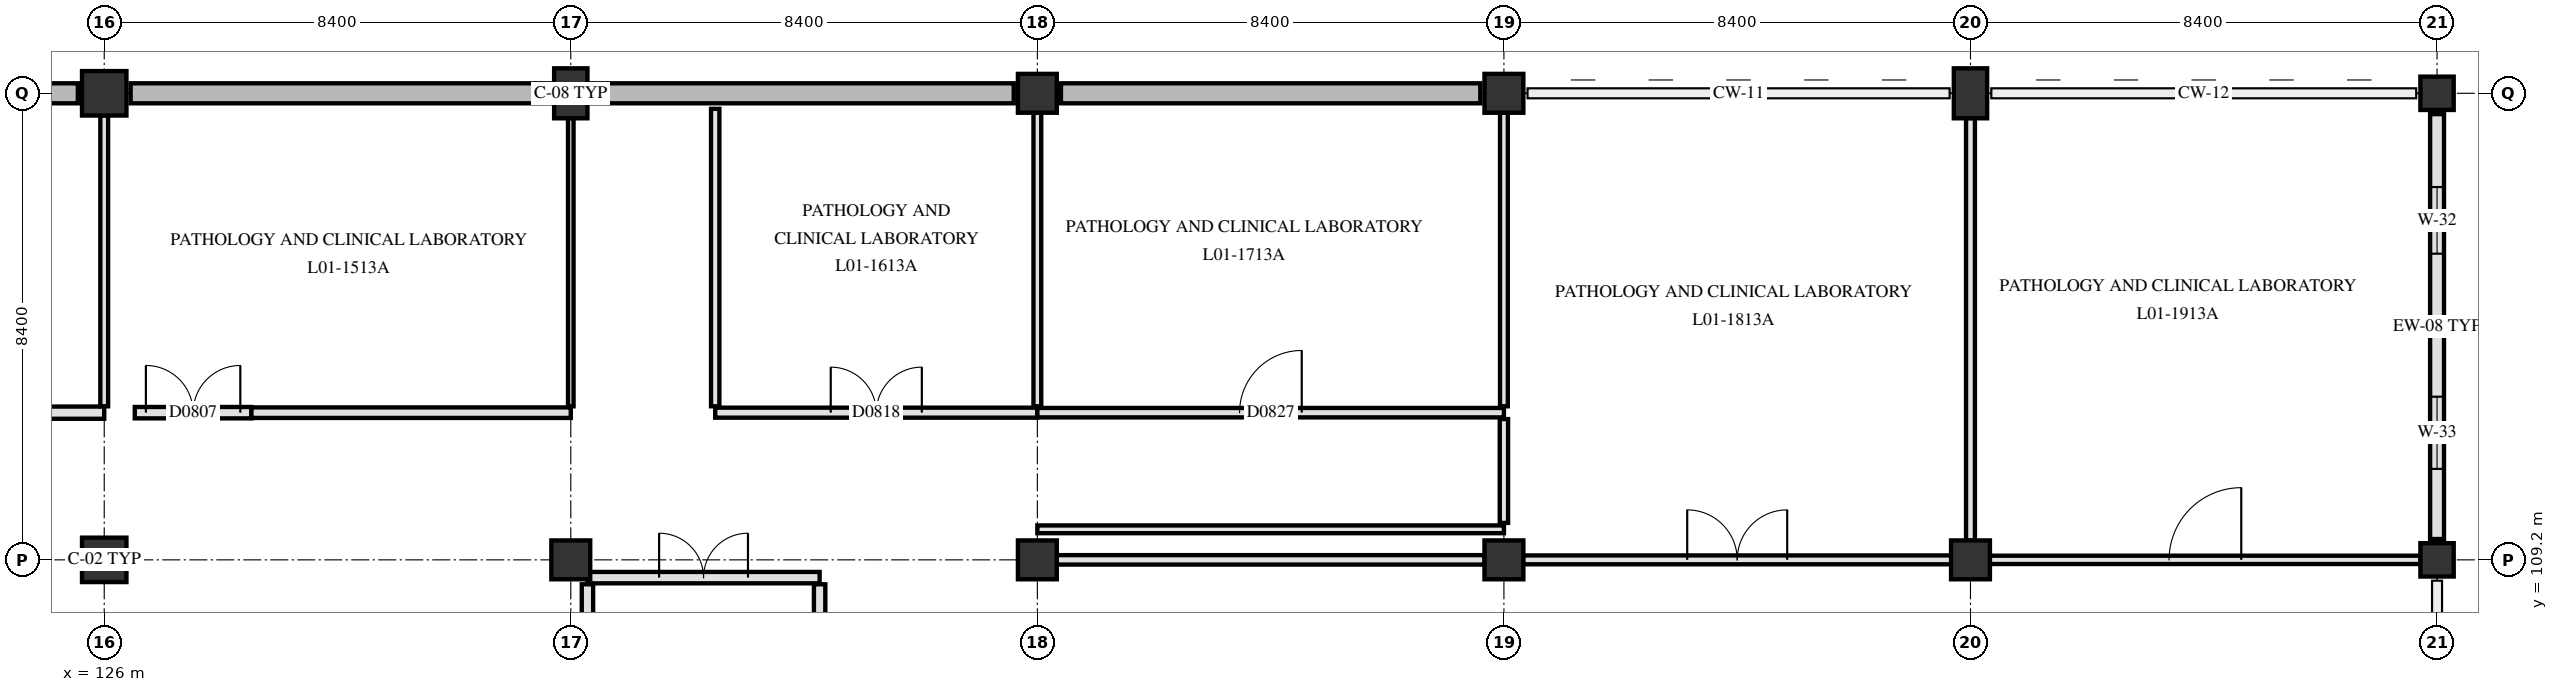
"""IFC4 building model, lengths in metres.
Left out: names, types, materials, properties, quantities, classifications, styles, units other than length and angle.
Written with IfcOpenShell. Run it as: python <this file> out.ifc"""

import sys

from ifc_helpers import new_model, si_unit, direction, frame, frame_2d, origin, origin_2d, place, context, subcontext, project, spatial, rectangle, extrude, element, fill, save


model = new_model("IFC4")
c1 = context("Model", 3, precision=1e-05, world=origin(), true_north=direction((0.0, 1.0)))
c2 = subcontext(c1, "Body", "Model", "MODEL_VIEW")
j1 = project(units=[si_unit("LENGTHUNIT", "METRE"), si_unit("PLANEANGLEUNIT", "RADIAN")], contexts=[c1])
p1 = place(None, origin())
s1 = spatial("IfcSite", under=j1, at=p1, CompositionType="ELEMENT")
p2 = place(p1, origin())
s2 = spatial("IfcBuilding", under=s1, at=p2, CompositionType="ELEMENT")
p3 = place(p2, frame((0.0, 0.0, 4.8)))
s3 = spatial("IfcBuildingStorey", under=s2, at=p3, CompositionType="ELEMENT", Elevation=4.8)
for number, where, z_axis, x_axis in (
    (1, (126.0, 109.2, 0.0), (0.0, 0.0, 1.0), (1.0, 0.0, 0.0)),
    (2, (126.0, 117.6, 0.0), (0.0, 0.0, 1.0), (1.0, 0.0, 0.0)),
):
    element("IfcColumn", number, at=place(p3, frame(where, z_axis=z_axis, x_axis=x_axis)), inside=s3, PredefinedType="COLUMN", context=c2, shape_type="SweptSolid", body=[
        extrude(rectangle(XDim=0.8, YDim=0.8, at=origin_2d()), origin(), (0.0, 0.0, 1.0), 4.5),
    ])
p4 = place(p3, frame((134.4, 109.2, 0.0), z_axis=(0.0, 0.0, 1.0), x_axis=(1.0, 0.0, 0.0)))
e3 = element("IfcColumn", 3, at=p4, inside=s3, PredefinedType="COLUMN", context=c2, shape_type="SweptSolid", body=[
    extrude(rectangle(XDim=0.7, YDim=0.7, at=origin_2d()), origin(), (0.0, 0.0, 1.0), 4.5),
])
p5 = place(p3, frame((134.4, 117.6, 0.0), z_axis=(0.0, 0.0, 1.0), x_axis=(1.0, 0.0, 0.0)))
e4 = element("IfcColumn", 4, at=p5, inside=s3, PredefinedType="PILASTER", context=c2, shape_type="SweptSolid", body=[
    extrude(rectangle(XDim=0.6, YDim=0.9, at=origin_2d()), origin(), (0.0, 0.0, 1.0), 4.5),
])
for number, where, z_axis, x_axis in (
    (5, (142.8, 109.2, 0.0), (0.0, 0.0, 1.0), (1.0, 0.0, 0.0)),
    (6, (142.8, 117.6, 0.0), (0.0, 0.0, 1.0), (1.0, 0.0, 0.0)),
    (7, (151.2, 109.2, 0.0), (0.0, 0.0, 1.0), (1.0, 0.0, 0.0)),
    (8, (151.2, 117.6, 0.0), (0.0, 0.0, 1.0), (1.0, 0.0, 0.0)),
    (9, (159.6, 109.2, 0.0), (0.0, 0.0, 1.0), (1.0, 0.0, 0.0)),
):
    element("IfcColumn", number, at=place(p3, frame(where, z_axis=z_axis, x_axis=x_axis)), inside=s3, PredefinedType="COLUMN", context=c2, shape_type="SweptSolid", body=[
        extrude(rectangle(XDim=0.7, YDim=0.7, at=origin_2d()), origin(), (0.0, 0.0, 1.0), 4.5),
    ])
p6 = place(p3, frame((159.6, 117.6, 0.0), z_axis=(0.0, 0.0, 1.0), x_axis=(1.0, 0.0, 0.0)))
e10 = element("IfcColumn", 10, at=p6, inside=s3, PredefinedType="PILASTER", context=c2, shape_type="SweptSolid", body=[
    extrude(rectangle(XDim=0.6, YDim=0.9, at=origin_2d()), origin(), (0.0, 0.0, 1.0), 4.5),
])
for number, where, z_axis, x_axis in (
    (11, (168.0, 109.2, 0.0), (0.0, 0.0, 1.0), (1.0, 0.0, 0.0)),
    (12, (168.0, 117.6, 0.0), (0.0, 0.0, 1.0), (1.0, 0.0, 0.0)),
):
    element("IfcColumn", number, at=place(p3, frame(where, z_axis=z_axis, x_axis=x_axis)), inside=s3, PredefinedType="COLUMN", context=c2, shape_type="SweptSolid", body=[
        extrude(rectangle(XDim=0.6, YDim=0.6, at=origin_2d()), origin(), (0.0, 0.0, 1.0), 4.5),
    ])
p7 = place(p3, frame((118.075, 117.6, 0.0), z_axis=(0.0, 0.0, 1.0), x_axis=(1.0, 0.0, 0.0)))
e13 = element("IfcWall", 13, at=p7, inside=s3, PredefinedType="SOLIDWALL", context=c2, shape_type="SweptSolid", body=[
    extrude(rectangle(XDim=7.45, YDim=0.36, at=frame_2d((3.725, 0.0))), origin(), (0.0, 0.0, 1.0), 4.15),
])
p8 = place(p3, frame((126.475, 117.6, 0.0), z_axis=(0.0, 0.0, 1.0), x_axis=(1.0, 0.0, 0.0)))
e14 = element("IfcWall", 14, at=p8, inside=s3, PredefinedType="SOLIDWALL", context=c2, shape_type="SweptSolid", body=[
    extrude(rectangle(XDim=7.55, YDim=0.36, at=frame_2d((3.775, 0.0))), origin(), (0.0, 0.0, 1.0), 4.15),
])
p9 = place(p3, frame((134.775, 117.6, 0.0), z_axis=(0.0, 0.0, 1.0), x_axis=(1.0, 0.0, 0.0)))
e15 = element("IfcWall", 15, at=p9, inside=s3, PredefinedType="SOLIDWALL", context=c2, shape_type="SweptSolid", body=[
    extrude(rectangle(XDim=7.6, YDim=0.36, at=frame_2d((3.8, 0.0))), origin(), (0.0, 0.0, 1.0), 4.15),
])
p10 = place(p3, frame((143.225, 117.6, 0.0), z_axis=(0.0, 0.0, 1.0), x_axis=(1.0, 0.0, 0.0)))
e16 = element("IfcWall", 16, at=p10, inside=s3, PredefinedType="SOLIDWALL", context=c2, shape_type="SweptSolid", body=[
    extrude(rectangle(XDim=7.55, YDim=0.36, at=frame_2d((3.775, 0.0))), origin(), (0.0, 0.0, 1.0), 4.15),
])
p11 = place(p3, frame((168.0, 117.225, 0.0), z_axis=(0.0, 0.0, 1.0), x_axis=(0.0, -1.0, 0.0)))
e17 = element("IfcWall", 17, at=p11, inside=s3, PredefinedType="SOLIDWALL", context=c2, shape_type="SweptSolid", body=[
    extrude(rectangle(XDim=7.65, YDim=0.25, at=frame_2d((3.825, 0.0))), origin(), (0.0, 0.0, 1.0), 3.44),
])
p12 = place(p11, frame((1.312, 0.0, 0.85)))
e18 = element("IfcOpeningElement", 18, at=p12, cuts=e17, PredefinedType="OPENING", context=c2, shape_type="SweptSolid", body=[
    extrude(rectangle(XDim=1.2, YDim=1.66, at=frame_2d((0.6, 0.83))), frame((0.0, 0.135, 0.0), z_axis=(0.0, -1.0, 0.0), x_axis=(1.0, 0.0, 0.0)), (0.0, 0.0, 1.0), 0.27),
])
p13 = place(p11, frame((5.087, 0.0, 0.85)))
e19 = element("IfcOpeningElement", 19, at=p13, cuts=e17, PredefinedType="OPENING", context=c2, shape_type="SweptSolid", body=[
    extrude(rectangle(XDim=1.3, YDim=1.66, at=frame_2d((0.65, 0.83))), frame((0.0, 0.135, 0.0), z_axis=(0.0, -1.0, 0.0), x_axis=(1.0, 0.0, 0.0)), (0.0, 0.0, 1.0), 0.27),
])
p14 = place(p3, frame((138.88, 104.64, 0.0), z_axis=(0.0, 0.0, 1.0), x_axis=(0.0, 1.0, 0.0)))
e20 = element("IfcWall", 20, at=p14, inside=s3, PredefinedType="PARTITIONING", context=c2, shape_type="SweptSolid", body=[
    extrude(rectangle(XDim=4.12, YDim=0.205, at=frame_2d((2.06, 0.0))), origin(), (0.0, 0.0, 1.0), 4.14),
])
p15 = place(p3, frame((134.7, 104.64, 0.0), z_axis=(0.0, 0.0, 1.0), x_axis=(0.0, 1.0, 0.0)))
e21 = element("IfcWall", 21, at=p15, inside=s3, PredefinedType="PARTITIONING", context=c2, shape_type="SweptSolid", body=[
    extrude(rectangle(XDim=4.12, YDim=0.205, at=frame_2d((2.06, 0.0))), origin(), (0.0, 0.0, 1.0), 3.59),
])
p16 = place(p3, frame((134.7, 108.88, 0.0), z_axis=(0.0, 0.0, 1.0), x_axis=(1.0, 0.0, 0.0)))
e22 = element("IfcWall", 22, at=p16, inside=s3, PredefinedType="PARTITIONING", context=c2, shape_type="SweptSolid", body=[
    extrude(rectangle(XDim=4.18, YDim=0.205, at=frame_2d((2.09, 0.0))), origin(), (0.0, 0.0, 1.0), 3.54),
])
p17 = place(p16, frame((1.29, 0.0, 0.0)))
e23 = element("IfcOpeningElement", 23, at=p17, cuts=e22, PredefinedType="OPENING", context=c2, shape_type="SweptSolid", body=[
    extrude(rectangle(XDim=1.6, YDim=2.25, at=frame_2d((0.8, 1.125))), frame((0.0, 0.113, 0.0), z_axis=(0.0, -1.0, 0.0), x_axis=(1.0, 0.0, 0.0)), (0.0, 0.0, 1.0), 0.225),
])
p18 = place(p3, frame((143.145, 109.2, 0.0), z_axis=(0.0, 0.0, 1.0), x_axis=(1.0, 0.0, 0.0)))
e24 = element("IfcWall", 24, at=p18, inside=s3, PredefinedType="PARTITIONING", context=c2, shape_type="SweptSolid", body=[
    extrude(rectangle(XDim=7.71, YDim=0.17, at=frame_2d((3.855, 0.0))), origin(), (0.0, 0.0, 1.0), 3.54),
])
p19 = place(p3, frame((151.545, 109.2, 0.0), z_axis=(0.0, 0.0, 1.0), x_axis=(1.0, 0.0, 0.0)))
e25 = element("IfcWall", 25, at=p19, inside=s3, PredefinedType="PARTITIONING", context=c2, shape_type="SweptSolid", body=[
    extrude(rectangle(XDim=7.71, YDim=0.16, at=frame_2d((3.855, 0.0))), origin(), (0.0, 0.0, 1.0), 3.54),
])
p20 = place(p19, frame((2.955, 0.0, 0.0)))
e26 = element("IfcOpeningElement", 26, at=p20, cuts=e25, PredefinedType="OPENING", context=c2, shape_type="SweptSolid", body=[
    extrude(rectangle(XDim=1.8, YDim=2.25, at=frame_2d((0.9, 1.125))), frame((0.0, 0.09, 0.0), z_axis=(0.0, -1.0, 0.0), x_axis=(1.0, 0.0, 0.0)), (0.0, 0.0, 1.0), 0.18),
])
p21 = place(p3, frame((159.945, 109.2, 0.0), z_axis=(0.0, 0.0, 1.0), x_axis=(1.0, 0.0, 0.0)))
e27 = element("IfcWall", 27, at=p21, inside=s3, PredefinedType="PARTITIONING", context=c2, shape_type="SweptSolid", body=[
    extrude(rectangle(XDim=7.76, YDim=0.15, at=frame_2d((3.88, 0.0))), origin(), (0.0, 0.0, 1.0), 3.54),
])
p22 = place(p21, frame((3.23, 0.0, 0.0)))
e28 = element("IfcOpeningElement", 28, at=p22, cuts=e27, PredefinedType="OPENING", context=c2, shape_type="SweptSolid", body=[
    extrude(rectangle(XDim=1.3, YDim=2.2, at=frame_2d((0.65, 1.1))), frame((0.0, 0.085, 0.0), z_axis=(0.0, -1.0, 0.0), x_axis=(1.0, 0.0, 0.0)), (0.0, 0.0, 1.0), 0.17),
])
p23 = place(p3, frame((142.8, 109.75, 0.0), z_axis=(0.0, 0.0, 1.0), x_axis=(1.0, 0.0, 0.0)))
e29 = element("IfcWall", 29, at=p23, inside=s3, PredefinedType="PARTITIONING", context=c2, shape_type="SweptSolid", body=[
    extrude(rectangle(XDim=8.4, YDim=0.14, at=frame_2d((4.2, 0.0))), origin(), (0.0, 0.0, 1.0), 3.59),
])
p24 = place(p3, frame((117.6, 111.85, 0.0), z_axis=(0.0, 0.0, 1.0), x_axis=(1.0, 0.0, 0.0)))
e30 = element("IfcWall", 30, at=p24, inside=s3, PredefinedType="PARTITIONING", context=c2, shape_type="SweptSolid", body=[
    extrude(rectangle(XDim=8.4, YDim=0.22, at=frame_2d((4.2, 0.0))), origin(), (0.0, 0.0, 1.0), 3.59),
])
p25 = place(p24, frame((3.74, 0.0, 0.0)))
e31 = element("IfcOpeningElement", 31, at=p25, cuts=e30, PredefinedType="OPENING", context=c2, shape_type="SweptSolid", body=[
    extrude(rectangle(XDim=0.92, YDim=2.08, at=frame_2d((0.46, 1.04))), frame((0.0, 0.12, 0.0), z_axis=(0.0, -1.0, 0.0), x_axis=(1.0, 0.0, 0.0)), (0.0, 0.0, 1.0), 0.24),
])
p26 = place(p3, frame((126.55, 111.85, 0.0), z_axis=(0.0, 0.0, 1.0), x_axis=(1.0, 0.0, 0.0)))
e32 = element("IfcWall", 32, at=p26, inside=s3, PredefinedType="PARTITIONING", context=c2, shape_type="SweptSolid", body=[
    extrude(rectangle(XDim=2.1, YDim=0.205, at=frame_2d((1.05, 0.0))), origin(), (0.0, 0.0, 1.0), 4.14),
])
p27 = place(p26, frame((0.2, 0.0, 0.0)))
e33 = element("IfcOpeningElement", 33, at=p27, cuts=e32, PredefinedType="OPENING", context=c2, shape_type="SweptSolid", body=[
    extrude(rectangle(XDim=1.7, YDim=2.25, at=frame_2d((0.85, 1.125))), frame((0.0, 0.113, 0.0), z_axis=(0.0, -1.0, 0.0), x_axis=(1.0, 0.0, 0.0)), (0.0, 0.0, 1.0), 0.225),
])
p28 = place(p3, frame((128.65, 111.85, 0.0), z_axis=(0.0, 0.0, 1.0), x_axis=(1.0, 0.0, 0.0)))
e34 = element("IfcWall", 34, at=p28, inside=s3, PredefinedType="PARTITIONING", context=c2, shape_type="SweptSolid", body=[
    extrude(rectangle(XDim=5.75, YDim=0.19, at=frame_2d((2.875, 0.0))), origin(), (0.0, 0.0, 1.0), 3.59),
])
p29 = place(p3, frame((137.0, 111.85, 0.0), z_axis=(0.0, 0.0, 1.0), x_axis=(1.0, 0.0, 0.0)))
e35 = element("IfcWall", 35, at=p29, inside=s3, PredefinedType="PARTITIONING", context=c2, shape_type="SweptSolid", body=[
    extrude(rectangle(XDim=5.8, YDim=0.18, at=frame_2d((2.9, 0.0))), origin(), (0.0, 0.0, 1.0), 3.59),
])
p30 = place(p29, frame((2.08, 0.0, 0.0)))
e36 = element("IfcOpeningElement", 36, at=p30, cuts=e35, PredefinedType="OPENING", context=c2, shape_type="SweptSolid", body=[
    extrude(rectangle(XDim=1.64, YDim=2.28, at=frame_2d((0.82, 1.14))), frame((0.0, 0.1, 0.0), z_axis=(0.0, -1.0, 0.0), x_axis=(1.0, 0.0, 0.0)), (0.0, 0.0, 1.0), 0.2),
])
p31 = place(p3, frame((142.8, 111.85, 0.0), z_axis=(0.0, 0.0, 1.0), x_axis=(1.0, 0.0, 0.0)))
e37 = element("IfcWall", 37, at=p31, inside=s3, PredefinedType="PARTITIONING", context=c2, shape_type="SweptSolid", body=[
    extrude(rectangle(XDim=8.4, YDim=0.17, at=frame_2d((4.2, 0.0))), origin(), (0.0, 0.0, 1.0), 3.59),
])
p32 = place(p31, frame((3.64, 0.0, 0.0)))
e38 = element("IfcOpeningElement", 38, at=p32, cuts=e37, PredefinedType="OPENING", context=c2, shape_type="SweptSolid", body=[
    extrude(rectangle(XDim=1.12, YDim=2.18, at=frame_2d((0.56, 1.09))), frame((0.0, 0.095, 0.0), z_axis=(0.0, -1.0, 0.0), x_axis=(1.0, 0.0, 0.0)), (0.0, 0.0, 1.0), 0.19),
])
p33 = place(p3, frame((126.0, 111.965, 0.0), z_axis=(0.0, 0.0, 1.0), x_axis=(0.0, 1.0, 0.0)))
e39 = element("IfcWall", 39, at=p33, inside=s3, PredefinedType="PARTITIONING", context=c2, shape_type="SweptSolid", body=[
    extrude(rectangle(XDim=5.24, YDim=0.14, at=frame_2d((2.62, 0.0))), origin(), (0.0, 0.0, 1.0), 3.59),
])
p34 = place(p3, frame((134.4, 111.965, 0.0), z_axis=(0.0, 0.0, 1.0), x_axis=(0.0, 1.0, 0.0)))
e40 = element("IfcWall", 40, at=p34, inside=s3, PredefinedType="PARTITIONING", context=c2, shape_type="SweptSolid", body=[
    extrude(rectangle(XDim=5.19, YDim=0.1, at=frame_2d((2.595, 0.0))), origin(), (0.0, 0.0, 1.0), 3.59),
])
p35 = place(p3, frame((137.0, 111.965, 0.0), z_axis=(0.0, 0.0, 1.0), x_axis=(0.0, 1.0, 0.0)))
e41 = element("IfcWall", 41, at=p35, inside=s3, PredefinedType="PARTITIONING", context=c2, shape_type="SweptSolid", body=[
    extrude(rectangle(XDim=5.355, YDim=0.15, at=frame_2d((2.677, 0.0))), origin(), (0.0, 0.0, 1.0), 4.14),
])
p36 = place(p3, frame((142.8, 111.965, 0.0), z_axis=(0.0, 0.0, 1.0), x_axis=(0.0, 1.0, 0.0)))
e42 = element("IfcWall", 42, at=p36, inside=s3, PredefinedType="PARTITIONING", context=c2, shape_type="SweptSolid", body=[
    extrude(rectangle(XDim=5.29, YDim=0.14, at=frame_2d((2.645, 0.0))), origin(), (0.0, 0.0, 1.0), 3.59),
])
p37 = place(p3, frame((151.2, 109.865, 0.0), z_axis=(0.0, 0.0, 1.0), x_axis=(0.0, 1.0, 0.0)))
e43 = element("IfcWall", 43, at=p37, inside=s3, PredefinedType="PARTITIONING", context=c2, shape_type="SweptSolid", body=[
    extrude(rectangle(XDim=1.87, YDim=0.15, at=frame_2d((0.935, 0.0))), origin(), (0.0, 0.0, 1.0), 3.59),
])
p38 = place(p3, frame((151.2, 111.965, 0.0), z_axis=(0.0, 0.0, 1.0), x_axis=(0.0, 1.0, 0.0)))
e44 = element("IfcWall", 44, at=p38, inside=s3, PredefinedType="PARTITIONING", context=c2, shape_type="SweptSolid", body=[
    extrude(rectangle(XDim=5.29, YDim=0.14, at=frame_2d((2.645, 0.0))), origin(), (0.0, 0.0, 1.0), 3.59),
])
p39 = place(p3, frame((159.6, 109.545, 0.0), z_axis=(0.0, 0.0, 1.0), x_axis=(0.0, 1.0, 0.0)))
e45 = element("IfcWall", 45, at=p39, inside=s3, PredefinedType="PARTITIONING", context=c2, shape_type="SweptSolid", body=[
    extrude(rectangle(XDim=7.61, YDim=0.16, at=frame_2d((3.805, 0.0))), origin(), (0.0, 0.0, 1.0), 3.59),
])
p40 = place(p12, origin())
e46 = element("IfcWindow", 46, at=p40, inside=s3, PartitioningType="SINGLE_PANEL", PredefinedType="WINDOW", context=c2, shape_type="SweptSolid", body=[
    extrude(rectangle(XDim=1.2, YDim=1.66, at=frame_2d((0.6, 0.83))), frame((0.0, 0.03, 0.0), z_axis=(0.0, -1.0, 0.0), x_axis=(1.0, 0.0, 0.0)), (0.0, 0.0, 1.0), 0.06),
])
fill(e18, e46)
p41 = place(p13, origin())
e47 = element("IfcWindow", 47, at=p41, inside=s3, PartitioningType="SINGLE_PANEL", PredefinedType="WINDOW", context=c2, shape_type="SweptSolid", body=[
    extrude(rectangle(XDim=1.3, YDim=1.66, at=frame_2d((0.65, 0.83))), frame((0.0, 0.03, 0.0), z_axis=(0.0, -1.0, 0.0), x_axis=(1.0, 0.0, 0.0)), (0.0, 0.0, 1.0), 0.06),
])
fill(e19, e47)
p42 = place(p17, origin())
e48 = element("IfcDoor", 48, at=p42, inside=s3, OperationType="DOUBLE_SWING_LEFT", PredefinedType="DOOR", context=c2, shape_type="SweptSolid", body=[
    extrude(rectangle(XDim=1.6, YDim=2.25, at=frame_2d((0.8, 1.125))), frame((0.0, 0.025, 0.0), z_axis=(0.0, -1.0, 0.0), x_axis=(1.0, 0.0, 0.0)), (0.0, 0.0, 1.0), 0.05),
])
fill(e23, e48)
p43 = place(p27, origin())
e49 = element("IfcDoor", 49, at=p43, inside=s3, OperationType="DOUBLE_SWING_RIGHT", PredefinedType="DOOR", context=c2, shape_type="SweptSolid", body=[
    extrude(rectangle(XDim=1.7, YDim=2.25, at=frame_2d((0.85, 1.125))), frame((0.0, 0.025, 0.0), z_axis=(0.0, -1.0, 0.0), x_axis=(1.0, 0.0, 0.0)), (0.0, 0.0, 1.0), 0.05),
])
fill(e33, e49)
p44 = place(p30, origin())
e50 = element("IfcDoor", 50, at=p44, inside=s3, OperationType="DOUBLE_SWING_LEFT", PredefinedType="DOOR", context=c2, shape_type="SweptSolid", body=[
    extrude(rectangle(XDim=1.64, YDim=2.28, at=frame_2d((0.82, 1.14))), frame((0.0, 0.025, 0.0), z_axis=(0.0, -1.0, 0.0), x_axis=(1.0, 0.0, 0.0)), (0.0, 0.0, 1.0), 0.05),
])
fill(e36, e50)
p45 = place(p32, origin())
e51 = element("IfcDoor", 51, at=p45, inside=s3, OperationType="SINGLE_SWING_RIGHT", PredefinedType="DOOR", context=c2, shape_type="SweptSolid", body=[
    extrude(rectangle(XDim=1.12, YDim=2.18, at=frame_2d((0.56, 1.09))), frame((0.0, 0.025, 0.0), z_axis=(0.0, -1.0, 0.0), x_axis=(1.0, 0.0, 0.0)), (0.0, 0.0, 1.0), 0.05),
])
fill(e38, e51)
p46 = place(p20, origin())
e52 = element("IfcDoor", 52, at=p46, inside=s3, OperationType="DOUBLE_SWING_RIGHT", PredefinedType="DOOR", context=c2, shape_type="SweptSolid", body=[
    extrude(rectangle(XDim=1.8, YDim=2.25, at=frame_2d((0.9, 1.125))), frame((0.0, 0.025, 0.0), z_axis=(0.0, -1.0, 0.0), x_axis=(1.0, 0.0, 0.0)), (0.0, 0.0, 1.0), 0.05),
])
fill(e26, e52)
p47 = place(p22, origin())
e53 = element("IfcDoor", 53, at=p47, inside=s3, OperationType="SINGLE_SWING_RIGHT", PredefinedType="DOOR", context=c2, shape_type="SweptSolid", body=[
    extrude(rectangle(XDim=1.3, YDim=2.2, at=frame_2d((0.65, 1.1))), frame((0.0, 0.025, 0.0), z_axis=(0.0, -1.0, 0.0), x_axis=(1.0, 0.0, 0.0)), (0.0, 0.0, 1.0), 0.05),
])
fill(e28, e53)
save(model, sys.argv[1])
